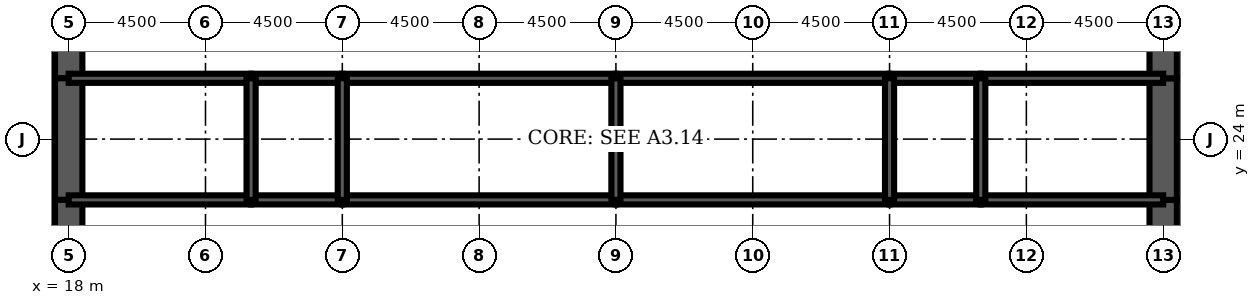
"""IFC4 building model, lengths in metres.
Left out: names, types, materials, properties, quantities, classifications, styles, units other than length and angle.
Written with IfcOpenShell. Run it as: python <this file> out.ifc"""

import sys

from ifc_helpers import new_model, si_unit, direction, frame, frame_2d, origin, place, context, subcontext, project, spatial, rectangle, extrude, element, fill, save


model = new_model("IFC4")
c1 = context("Model", 3, precision=1e-05, world=origin(), true_north=direction((0.0, 1.0)))
c2 = subcontext(c1, "Body", "Model", "MODEL_VIEW")
j1 = project(units=[si_unit("LENGTHUNIT", "METRE"), si_unit("PLANEANGLEUNIT", "RADIAN")], contexts=[c1])
p1 = place(None, origin())
s1 = spatial("IfcSite", under=j1, at=p1, CompositionType="ELEMENT")
p2 = place(p1, origin())
s2 = spatial("IfcBuilding", under=s1, at=p2, CompositionType="ELEMENT")
p3 = place(p2, frame((0.0, 0.0, 59.0)))
s3 = spatial("IfcBuildingStorey", under=s2, at=p3, CompositionType="ELEMENT", Elevation=59.0)
p4 = place(p3, frame((18.0, 28.8, 0.0), z_axis=(0.0, 0.0, 1.0), x_axis=(0.0, -1.0, 0.0)))
e1 = element("IfcWall", 1, at=p4, inside=s3, PredefinedType="SHEAR", context=c2, shape_type="SweptSolid", body=[
    extrude(rectangle(XDim=2.8, YDim=0.9, at=frame_2d((1.4, 0.0))), origin(), (0.0, 0.0, 1.0), 4.5),
])
p5 = place(p4, frame((0.4, 0.0, 0.0)))
e2 = element("IfcOpeningElement", 2, at=p5, cuts=e1, PredefinedType="OPENING", context=c2, shape_type="SweptSolid", body=[
    extrude(rectangle(XDim=1.8, YDim=2.1, at=frame_2d((0.9, 1.05))), frame((0.0, 0.46, 0.0), z_axis=(0.0, -1.0, 0.0), x_axis=(1.0, 0.0, 0.0)), (0.0, 0.0, 1.0), 0.92),
])
p6 = place(p3, frame((18.0, 26.0, 0.0), z_axis=(0.0, 0.0, 1.0), x_axis=(0.0, -1.0, 0.0)))
e3 = element("IfcWall", 3, at=p6, inside=s3, PredefinedType="SHEAR", context=c2, shape_type="SweptSolid", body=[
    extrude(rectangle(XDim=4.0, YDim=0.9, at=frame_2d((2.0, 0.0))), origin(), (0.0, 0.0, 1.0), 4.5),
])
p7 = place(p3, frame((18.0, 22.0, 0.0), z_axis=(0.0, 0.0, 1.0), x_axis=(0.0, -1.0, 0.0)))
e4 = element("IfcWall", 4, at=p7, inside=s3, PredefinedType="SHEAR", context=c2, shape_type="SweptSolid", body=[
    extrude(rectangle(XDim=2.8, YDim=0.9, at=frame_2d((1.4, 0.0))), origin(), (0.0, 0.0, 1.0), 4.5),
])
p8 = place(p7, frame((0.6, 0.0, 0.0)))
e5 = element("IfcOpeningElement", 5, at=p8, cuts=e4, PredefinedType="OPENING", context=c2, shape_type="SweptSolid", body=[
    extrude(rectangle(XDim=1.8, YDim=2.1, at=frame_2d((0.9, 1.05))), frame((0.0, 0.46, 0.0), z_axis=(0.0, -1.0, 0.0), x_axis=(1.0, 0.0, 0.0)), (0.0, 0.0, 1.0), 0.92),
])
p9 = place(p3, frame((54.0, 19.2, 0.0), z_axis=(0.0, 0.0, 1.0), x_axis=(0.0, 1.0, 0.0)))
e6 = element("IfcWall", 6, at=p9, inside=s3, PredefinedType="SHEAR", context=c2, shape_type="SweptSolid", body=[
    extrude(rectangle(XDim=2.8, YDim=0.9, at=frame_2d((1.4, 0.0))), origin(), (0.0, 0.0, 1.0), 4.5),
])
p10 = place(p9, frame((0.4, 0.0, 0.0)))
e7 = element("IfcOpeningElement", 7, at=p10, cuts=e6, PredefinedType="OPENING", context=c2, shape_type="SweptSolid", body=[
    extrude(rectangle(XDim=1.8, YDim=2.1, at=frame_2d((0.9, 1.05))), frame((0.0, 0.46, 0.0), z_axis=(0.0, -1.0, 0.0), x_axis=(1.0, 0.0, 0.0)), (0.0, 0.0, 1.0), 0.92),
])
p11 = place(p3, frame((54.0, 22.0, 0.0), z_axis=(0.0, 0.0, 1.0), x_axis=(0.0, 1.0, 0.0)))
e8 = element("IfcWall", 8, at=p11, inside=s3, PredefinedType="SHEAR", context=c2, shape_type="SweptSolid", body=[
    extrude(rectangle(XDim=4.0, YDim=0.9, at=frame_2d((2.0, 0.0))), origin(), (0.0, 0.0, 1.0), 4.5),
])
p12 = place(p3, frame((54.0, 26.0, 0.0), z_axis=(0.0, 0.0, 1.0), x_axis=(0.0, 1.0, 0.0)))
e9 = element("IfcWall", 9, at=p12, inside=s3, PredefinedType="SHEAR", context=c2, shape_type="SweptSolid", body=[
    extrude(rectangle(XDim=2.8, YDim=0.9, at=frame_2d((1.4, 0.0))), origin(), (0.0, 0.0, 1.0), 4.5),
])
p13 = place(p12, frame((0.6, 0.0, 0.0)))
e10 = element("IfcOpeningElement", 10, at=p13, cuts=e9, PredefinedType="OPENING", context=c2, shape_type="SweptSolid", body=[
    extrude(rectangle(XDim=1.8, YDim=2.1, at=frame_2d((0.9, 1.05))), frame((0.0, 0.46, 0.0), z_axis=(0.0, -1.0, 0.0), x_axis=(1.0, 0.0, 0.0)), (0.0, 0.0, 1.0), 0.92),
])
p14 = place(p3, frame((18.0, 22.0, 0.0), z_axis=(0.0, 0.0, 1.0), x_axis=(1.0, 0.0, 0.0)))
e11 = element("IfcWall", 11, at=p14, inside=s3, PredefinedType="SOLIDWALL", context=c2, shape_type="SweptSolid", body=[
    extrude(rectangle(XDim=6.0, YDim=0.3, at=frame_2d((3.0, 0.0))), origin(), (0.0, 0.0, 1.0), 4.5),
])
p15 = place(p14, frame((4.4, 0.0, 0.0)))
e12 = element("IfcOpeningElement", 12, at=p15, cuts=e11, PredefinedType="OPENING", context=c2, shape_type="SweptSolid", body=[
    extrude(rectangle(XDim=1.0, YDim=2.1, at=frame_2d((0.5, 1.05))), frame((0.0, 0.16, 0.0), z_axis=(0.0, -1.0, 0.0), x_axis=(1.0, 0.0, 0.0)), (0.0, 0.0, 1.0), 0.32),
])
p16 = place(p14, frame((1.0, 0.0, 0.0)))
e13 = element("IfcOpeningElement", 13, at=p16, cuts=e11, PredefinedType="OPENING", context=c2, shape_type="SweptSolid", body=[
    extrude(rectangle(XDim=1.0, YDim=2.1, at=frame_2d((0.5, 1.05))), frame((0.0, 0.16, 0.0), z_axis=(0.0, -1.0, 0.0), x_axis=(1.0, 0.0, 0.0)), (0.0, 0.0, 1.0), 0.32),
])
p17 = place(p3, frame((24.0, 22.0, 0.0), z_axis=(0.0, 0.0, 1.0), x_axis=(1.0, 0.0, 0.0)))
e14 = element("IfcWall", 14, at=p17, inside=s3, PredefinedType="SOLIDWALL", context=c2, shape_type="SweptSolid", body=[
    extrude(rectangle(XDim=3.0, YDim=0.3, at=frame_2d((1.5, 0.0))), origin(), (0.0, 0.0, 1.0), 4.5),
])
p18 = place(p17, frame((1.0, 0.0, 0.0)))
e15 = element("IfcOpeningElement", 15, at=p18, cuts=e14, PredefinedType="OPENING", context=c2, shape_type="SweptSolid", body=[
    extrude(rectangle(XDim=1.0, YDim=2.1, at=frame_2d((0.5, 1.05))), frame((0.0, 0.16, 0.0), z_axis=(0.0, -1.0, 0.0), x_axis=(1.0, 0.0, 0.0)), (0.0, 0.0, 1.0), 0.32),
])
p19 = place(p3, frame((27.0, 22.0, 0.0), z_axis=(0.0, 0.0, 1.0), x_axis=(1.0, 0.0, 0.0)))
e16 = element("IfcWall", 16, at=p19, inside=s3, PredefinedType="SOLIDWALL", context=c2, shape_type="SweptSolid", body=[
    extrude(rectangle(XDim=9.0, YDim=0.3, at=frame_2d((4.5, 0.0))), origin(), (0.0, 0.0, 1.0), 4.5),
])
p20 = place(p19, frame((4.0, 0.0, 0.0)))
e17 = element("IfcOpeningElement", 17, at=p20, cuts=e16, PredefinedType="OPENING", context=c2, shape_type="SweptSolid", body=[
    extrude(rectangle(XDim=1.0, YDim=2.1, at=frame_2d((0.5, 1.05))), frame((0.0, 0.16, 0.0), z_axis=(0.0, -1.0, 0.0), x_axis=(1.0, 0.0, 0.0)), (0.0, 0.0, 1.0), 0.32),
])
p21 = place(p3, frame((36.0, 22.0, 0.0), z_axis=(0.0, 0.0, 1.0), x_axis=(1.0, 0.0, 0.0)))
e18 = element("IfcWall", 18, at=p21, inside=s3, PredefinedType="SOLIDWALL", context=c2, shape_type="SweptSolid", body=[
    extrude(rectangle(XDim=9.0, YDim=0.3, at=frame_2d((4.5, 0.0))), origin(), (0.0, 0.0, 1.0), 4.5),
])
p22 = place(p21, frame((4.0, 0.0, 0.0)))
e19 = element("IfcOpeningElement", 19, at=p22, cuts=e18, PredefinedType="OPENING", context=c2, shape_type="SweptSolid", body=[
    extrude(rectangle(XDim=1.0, YDim=2.1, at=frame_2d((0.5, 1.05))), frame((0.0, 0.16, 0.0), z_axis=(0.0, -1.0, 0.0), x_axis=(1.0, 0.0, 0.0)), (0.0, 0.0, 1.0), 0.32),
])
p23 = place(p3, frame((45.0, 22.0, 0.0), z_axis=(0.0, 0.0, 1.0), x_axis=(1.0, 0.0, 0.0)))
e20 = element("IfcWall", 20, at=p23, inside=s3, PredefinedType="SOLIDWALL", context=c2, shape_type="SweptSolid", body=[
    extrude(rectangle(XDim=3.0, YDim=0.3, at=frame_2d((1.5, 0.0))), origin(), (0.0, 0.0, 1.0), 4.5),
])
p24 = place(p23, frame((1.0, 0.0, 0.0)))
e21 = element("IfcOpeningElement", 21, at=p24, cuts=e20, PredefinedType="OPENING", context=c2, shape_type="SweptSolid", body=[
    extrude(rectangle(XDim=1.0, YDim=2.1, at=frame_2d((0.5, 1.05))), frame((0.0, 0.16, 0.0), z_axis=(0.0, -1.0, 0.0), x_axis=(1.0, 0.0, 0.0)), (0.0, 0.0, 1.0), 0.32),
])
p25 = place(p3, frame((48.0, 22.0, 0.0), z_axis=(0.0, 0.0, 1.0), x_axis=(1.0, 0.0, 0.0)))
e22 = element("IfcWall", 22, at=p25, inside=s3, PredefinedType="SOLIDWALL", context=c2, shape_type="SweptSolid", body=[
    extrude(rectangle(XDim=6.0, YDim=0.3, at=frame_2d((3.0, 0.0))), origin(), (0.0, 0.0, 1.0), 4.5),
])
p26 = place(p25, frame((2.0, 0.0, 0.0)))
e23 = element("IfcOpeningElement", 23, at=p26, cuts=e22, PredefinedType="OPENING", context=c2, shape_type="SweptSolid", body=[
    extrude(rectangle(XDim=1.0, YDim=2.1, at=frame_2d((0.5, 1.05))), frame((0.0, 0.16, 0.0), z_axis=(0.0, -1.0, 0.0), x_axis=(1.0, 0.0, 0.0)), (0.0, 0.0, 1.0), 0.32),
])
p27 = place(p25, frame((4.15, 0.0, 0.0)))
e24 = element("IfcOpeningElement", 24, at=p27, cuts=e22, PredefinedType="OPENING", context=c2, shape_type="SweptSolid", body=[
    extrude(rectangle(XDim=1.0, YDim=2.1, at=frame_2d((0.5, 1.05))), frame((0.0, 0.16, 0.0), z_axis=(0.0, -1.0, 0.0), x_axis=(1.0, 0.0, 0.0)), (0.0, 0.0, 1.0), 0.32),
])
p28 = place(p3, frame((18.0, 26.0, 0.0), z_axis=(0.0, 0.0, 1.0), x_axis=(1.0, 0.0, 0.0)))
e25 = element("IfcWall", 25, at=p28, inside=s3, PredefinedType="SOLIDWALL", context=c2, shape_type="SweptSolid", body=[
    extrude(rectangle(XDim=6.0, YDim=0.3, at=frame_2d((3.0, 0.0))), origin(), (0.0, 0.0, 1.0), 4.5),
])
p29 = place(p3, frame((24.0, 26.0, 0.0), z_axis=(0.0, 0.0, 1.0), x_axis=(1.0, 0.0, 0.0)))
e26 = element("IfcWall", 26, at=p29, inside=s3, PredefinedType="SOLIDWALL", context=c2, shape_type="SweptSolid", body=[
    extrude(rectangle(XDim=3.0, YDim=0.3, at=frame_2d((1.5, 0.0))), origin(), (0.0, 0.0, 1.0), 4.5),
])
for number, where, z_axis, x_axis in (
    (27, (27.0, 26.0, 0.0), (0.0, 0.0, 1.0), (1.0, 0.0, 0.0)),
    (28, (36.0, 26.0, 0.0), (0.0, 0.0, 1.0), (1.0, 0.0, 0.0)),
):
    element("IfcWall", number, at=place(p3, frame(where, z_axis=z_axis, x_axis=x_axis)), inside=s3, PredefinedType="SOLIDWALL", context=c2, shape_type="SweptSolid", body=[
        extrude(rectangle(XDim=9.0, YDim=0.3, at=frame_2d((4.5, 0.0))), origin(), (0.0, 0.0, 1.0), 4.5),
    ])
p30 = place(p3, frame((45.0, 26.0, 0.0), z_axis=(0.0, 0.0, 1.0), x_axis=(1.0, 0.0, 0.0)))
e29 = element("IfcWall", 29, at=p30, inside=s3, PredefinedType="SOLIDWALL", context=c2, shape_type="SweptSolid", body=[
    extrude(rectangle(XDim=3.0, YDim=0.3, at=frame_2d((1.5, 0.0))), origin(), (0.0, 0.0, 1.0), 4.5),
])
p31 = place(p3, frame((48.0, 26.0, 0.0), z_axis=(0.0, 0.0, 1.0), x_axis=(1.0, 0.0, 0.0)))
e30 = element("IfcWall", 30, at=p31, inside=s3, PredefinedType="SOLIDWALL", context=c2, shape_type="SweptSolid", body=[
    extrude(rectangle(XDim=6.0, YDim=0.3, at=frame_2d((3.0, 0.0))), origin(), (0.0, 0.0, 1.0), 4.5),
])
for number, where, z_axis, x_axis in (
    (31, (24.0, 22.0, 0.0), (0.0, 0.0, 1.0), (0.0, 1.0, 0.0)),
    (32, (27.0, 22.0, 0.0), (0.0, 0.0, 1.0), (0.0, 1.0, 0.0)),
    (33, (36.0, 22.0, 0.0), (0.0, 0.0, 1.0), (0.0, 1.0, 0.0)),
    (34, (45.0, 22.0, 0.0), (0.0, 0.0, 1.0), (0.0, 1.0, 0.0)),
    (35, (48.0, 22.0, 0.0), (0.0, 0.0, 1.0), (0.0, 1.0, 0.0)),
):
    element("IfcWall", number, at=place(p3, frame(where, z_axis=z_axis, x_axis=x_axis)), inside=s3, PredefinedType="SOLIDWALL", context=c2, shape_type="SweptSolid", body=[
        extrude(rectangle(XDim=4.0, YDim=0.3, at=frame_2d((2.0, 0.0))), origin(), (0.0, 0.0, 1.0), 4.5),
    ])
p32 = place(p3, frame((39.0, 22.15, 0.0), z_axis=(0.0, 0.0, 1.0), x_axis=(0.0, 1.0, 0.0)))
e36 = element("IfcWall", 36, at=p32, inside=s3, PredefinedType="PARTITIONING", context=c2, shape_type="SweptSolid", body=[
    extrude(rectangle(XDim=3.7, YDim=0.15, at=frame_2d((1.85, 0.0))), origin(), (0.0, 0.0, 1.0), 3.0),
])
p33 = place(p32, frame((2.2, 0.0, 0.0)))
e37 = element("IfcOpeningElement", 37, at=p33, cuts=e36, PredefinedType="OPENING", context=c2, shape_type="SweptSolid", body=[
    extrude(rectangle(XDim=1.0, YDim=2.1, at=frame_2d((0.5, 1.05))), frame((0.0, 0.085, 0.0), z_axis=(0.0, -1.0, 0.0), x_axis=(1.0, 0.0, 0.0)), (0.0, 0.0, 1.0), 0.17),
])
for number, where, z_axis, x_axis in (
    (38, (20.625, 22.15, 0.0), (0.0, 0.0, 1.0), (0.0, 1.0, 0.0)),
    (39, (51.675, 22.15, 0.0), (0.0, 0.0, 1.0), (0.0, 1.0, 0.0)),
):
    element("IfcWall", number, at=place(p3, frame(where, z_axis=z_axis, x_axis=x_axis)), inside=s3, PredefinedType="PARTITIONING", context=c2, shape_type="SweptSolid", body=[
        extrude(rectangle(XDim=3.7, YDim=0.15, at=frame_2d((1.85, 0.0))), origin(), (0.0, 0.0, 1.0), 3.0),
    ])
p34 = place(p33, origin())
e40 = element("IfcDoor", 40, at=p34, inside=s3, OperationType="SINGLE_SWING_RIGHT", PredefinedType="DOOR", context=c2, shape_type="SweptSolid", body=[
    extrude(rectangle(XDim=1.0, YDim=2.1, at=frame_2d((0.5, 1.05))), frame((0.0, 0.025, 0.0), z_axis=(0.0, -1.0, 0.0), x_axis=(1.0, 0.0, 0.0)), (0.0, 0.0, 1.0), 0.05),
])
fill(e37, e40)
p35 = place(p8, origin())
e41 = element("IfcDoor", 41, at=p35, inside=s3, OperationType="SINGLE_SWING_LEFT", PredefinedType="DOOR", context=c2, shape_type="SweptSolid", body=[
    extrude(rectangle(XDim=1.8, YDim=2.1, at=frame_2d((0.9, 1.05))), frame((0.0, 0.45, 0.0), z_axis=(0.0, -1.0, 0.0), x_axis=(1.0, 0.0, 0.0)), (0.0, 0.0, 1.0), 0.899),
])
fill(e5, e41)
p36 = place(p5, origin())
e42 = element("IfcDoor", 42, at=p36, inside=s3, OperationType="SINGLE_SWING_LEFT", PredefinedType="DOOR", context=c2, shape_type="SweptSolid", body=[
    extrude(rectangle(XDim=1.8, YDim=2.1, at=frame_2d((0.9, 1.05))), frame((0.0, 0.45, 0.0), z_axis=(0.0, -1.0, 0.0), x_axis=(1.0, 0.0, 0.0)), (0.0, 0.0, 1.0), 0.899),
])
fill(e2, e42)
p37 = place(p10, origin())
e43 = element("IfcDoor", 43, at=p37, inside=s3, OperationType="SINGLE_SWING_LEFT", PredefinedType="DOOR", context=c2, shape_type="SweptSolid", body=[
    extrude(rectangle(XDim=1.8, YDim=2.1, at=frame_2d((0.9, 1.05))), frame((0.0, 0.45, 0.0), z_axis=(0.0, -1.0, 0.0), x_axis=(1.0, 0.0, 0.0)), (0.0, 0.0, 1.0), 0.899),
])
fill(e7, e43)
p38 = place(p13, origin())
e44 = element("IfcDoor", 44, at=p38, inside=s3, OperationType="SINGLE_SWING_LEFT", PredefinedType="DOOR", context=c2, shape_type="SweptSolid", body=[
    extrude(rectangle(XDim=1.8, YDim=2.1, at=frame_2d((0.9, 1.05))), frame((0.0, 0.45, 0.0), z_axis=(0.0, -1.0, 0.0), x_axis=(1.0, 0.0, 0.0)), (0.0, 0.0, 1.0), 0.899),
])
fill(e10, e44)
p39 = place(p15, origin())
e45 = element("IfcDoor", 45, at=p39, inside=s3, OperationType="SINGLE_SWING_RIGHT", PredefinedType="DOOR", context=c2, shape_type="SweptSolid", body=[
    extrude(rectangle(XDim=1.0, YDim=2.1, at=frame_2d((0.5, 1.05))), frame((0.0, 0.025, 0.0), z_axis=(0.0, -1.0, 0.0), x_axis=(1.0, 0.0, 0.0)), (0.0, 0.0, 1.0), 0.05),
])
fill(e12, e45)
p40 = place(p18, origin())
e46 = element("IfcDoor", 46, at=p40, inside=s3, OperationType="SINGLE_SWING_LEFT", PredefinedType="DOOR", context=c2, shape_type="SweptSolid", body=[
    extrude(rectangle(XDim=1.0, YDim=2.1, at=frame_2d((0.5, 1.05))), frame((0.0, 0.025, 0.0), z_axis=(0.0, -1.0, 0.0), x_axis=(1.0, 0.0, 0.0)), (0.0, 0.0, 1.0), 0.05),
])
fill(e15, e46)
p41 = place(p20, origin())
e47 = element("IfcDoor", 47, at=p41, inside=s3, OperationType="SINGLE_SWING_LEFT", PredefinedType="DOOR", context=c2, shape_type="SweptSolid", body=[
    extrude(rectangle(XDim=1.0, YDim=2.1, at=frame_2d((0.5, 1.05))), frame((0.0, 0.025, 0.0), z_axis=(0.0, -1.0, 0.0), x_axis=(1.0, 0.0, 0.0)), (0.0, 0.0, 1.0), 0.05),
])
fill(e17, e47)
p42 = place(p22, origin())
e48 = element("IfcDoor", 48, at=p42, inside=s3, OperationType="SINGLE_SWING_LEFT", PredefinedType="DOOR", context=c2, shape_type="SweptSolid", body=[
    extrude(rectangle(XDim=1.0, YDim=2.1, at=frame_2d((0.5, 1.05))), frame((0.0, 0.025, 0.0), z_axis=(0.0, -1.0, 0.0), x_axis=(1.0, 0.0, 0.0)), (0.0, 0.0, 1.0), 0.05),
])
fill(e19, e48)
p43 = place(p24, origin())
e49 = element("IfcDoor", 49, at=p43, inside=s3, OperationType="SINGLE_SWING_LEFT", PredefinedType="DOOR", context=c2, shape_type="SweptSolid", body=[
    extrude(rectangle(XDim=1.0, YDim=2.1, at=frame_2d((0.5, 1.05))), frame((0.0, 0.025, 0.0), z_axis=(0.0, -1.0, 0.0), x_axis=(1.0, 0.0, 0.0)), (0.0, 0.0, 1.0), 0.05),
])
fill(e21, e49)
p44 = place(p26, origin())
e50 = element("IfcDoor", 50, at=p44, inside=s3, OperationType="SINGLE_SWING_LEFT", PredefinedType="DOOR", context=c2, shape_type="SweptSolid", body=[
    extrude(rectangle(XDim=1.0, YDim=2.1, at=frame_2d((0.5, 1.05))), frame((0.0, 0.025, 0.0), z_axis=(0.0, -1.0, 0.0), x_axis=(1.0, 0.0, 0.0)), (0.0, 0.0, 1.0), 0.05),
])
fill(e23, e50)
p45 = place(p16, origin())
e51 = element("IfcDoor", 51, at=p45, inside=s3, OperationType="SINGLE_SWING_LEFT", PredefinedType="DOOR", context=c2, shape_type="SweptSolid", body=[
    extrude(rectangle(XDim=1.0, YDim=2.1, at=frame_2d((0.5, 1.05))), frame((0.0, 0.025, 0.0), z_axis=(0.0, -1.0, 0.0), x_axis=(1.0, 0.0, 0.0)), (0.0, 0.0, 1.0), 0.05),
])
fill(e13, e51)
p46 = place(p27, origin())
e52 = element("IfcDoor", 52, at=p46, inside=s3, OperationType="SINGLE_SWING_RIGHT", PredefinedType="DOOR", context=c2, shape_type="SweptSolid", body=[
    extrude(rectangle(XDim=1.0, YDim=2.1, at=frame_2d((0.5, 1.05))), frame((0.0, 0.025, 0.0), z_axis=(0.0, -1.0, 0.0), x_axis=(1.0, 0.0, 0.0)), (0.0, 0.0, 1.0), 0.05),
])
fill(e24, e52)
save(model, sys.argv[1])
